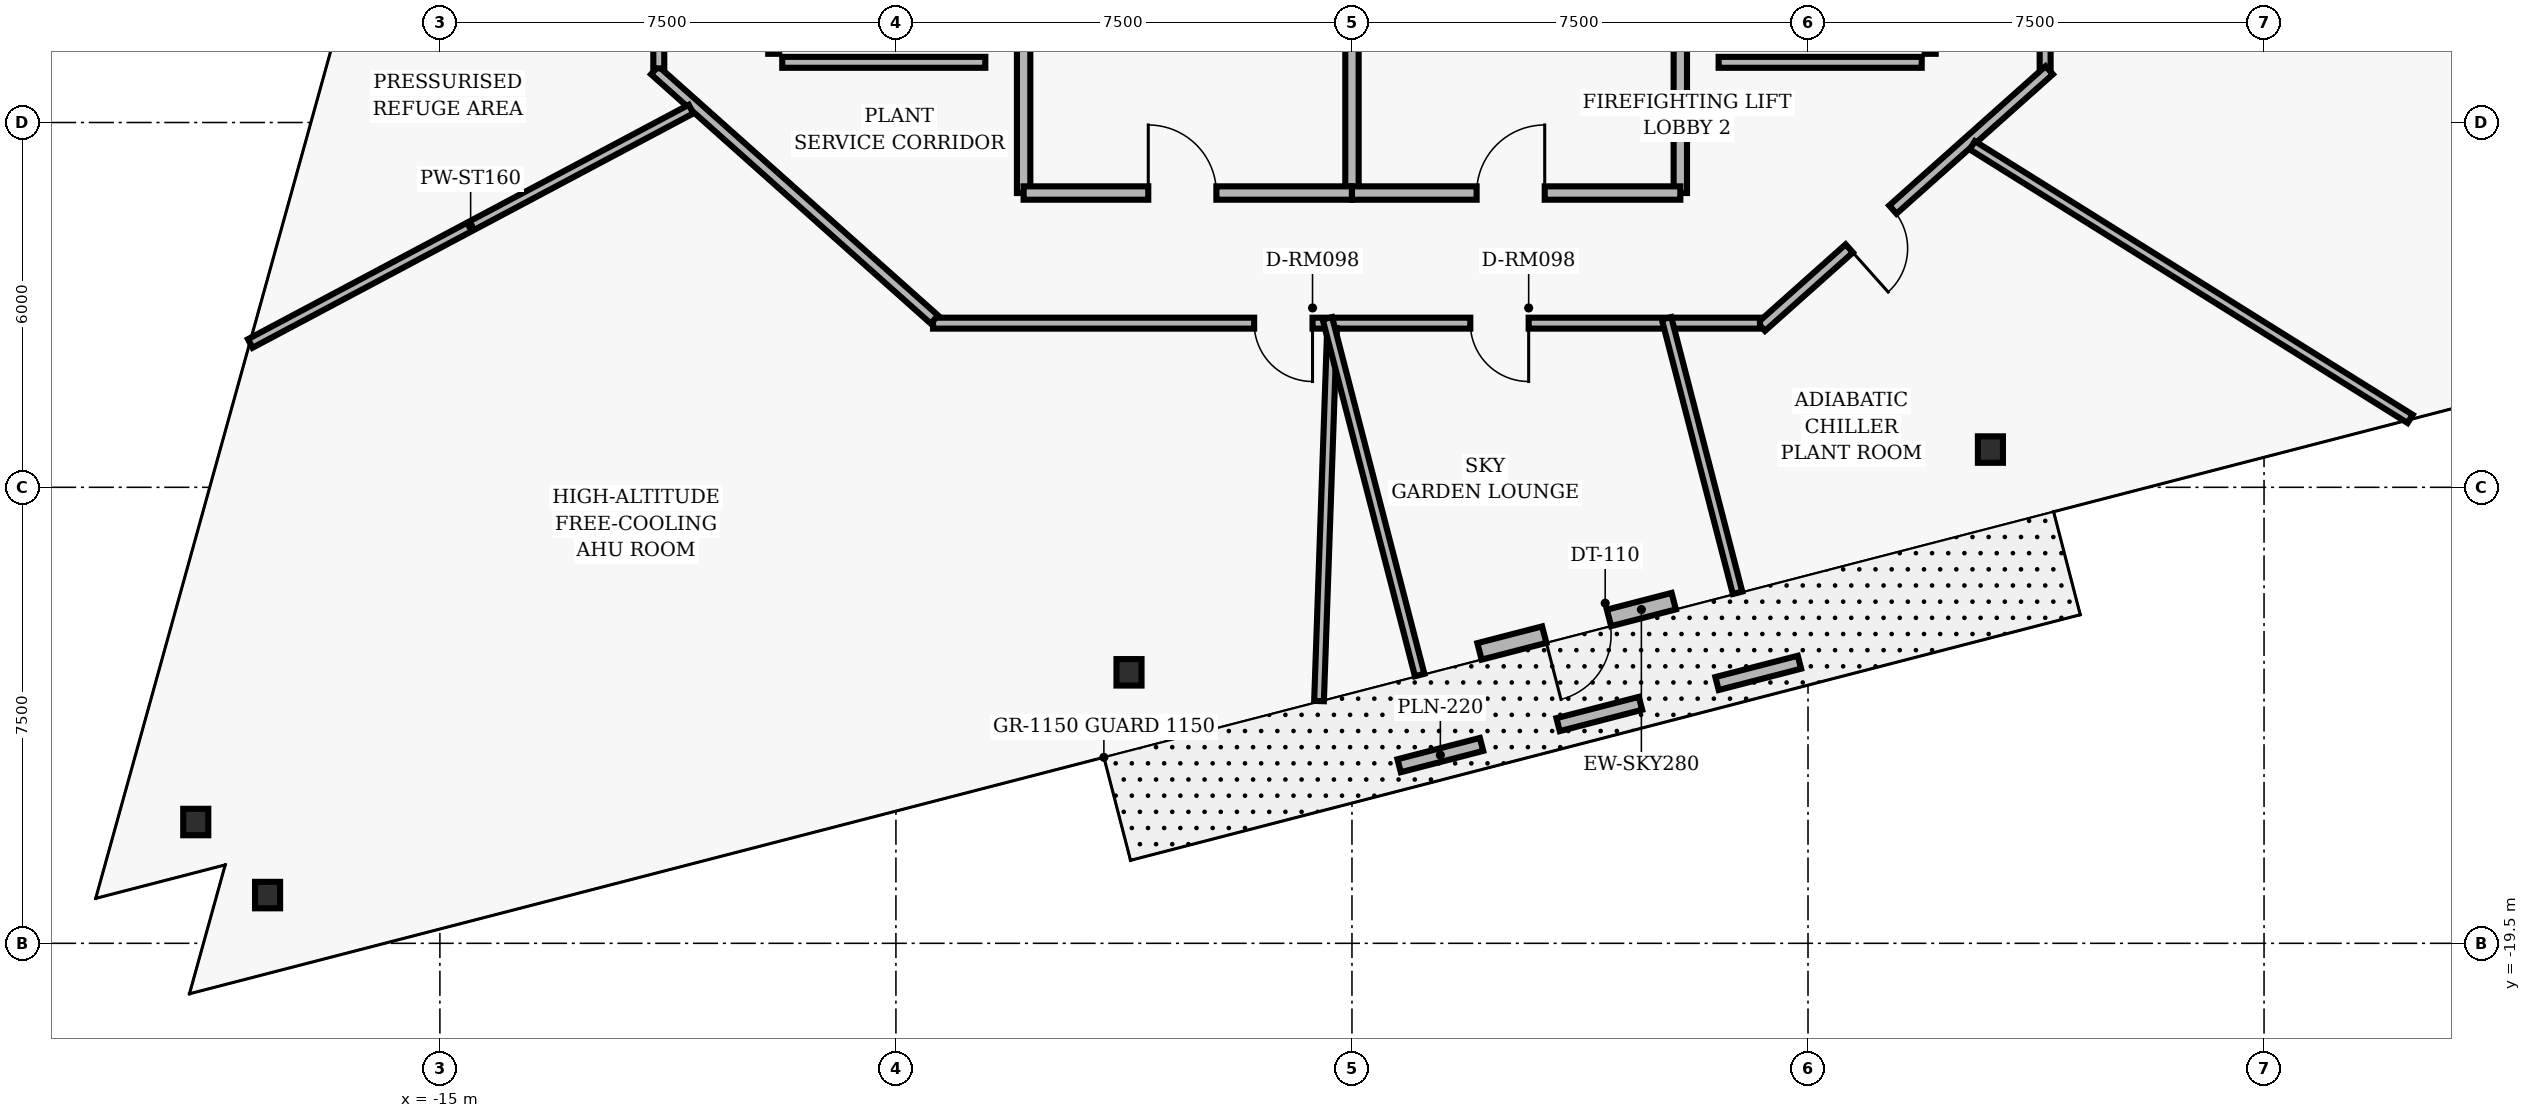
"""IFC4 building model, lengths in metres.
Left out: names, types, materials, properties, quantities, classifications, styles, units other than length and angle.
Written with IfcOpenShell. Run it as: python <this file> out.ifc"""

import sys

from ifc_helpers import new_model, si_unit, direction, frame, frame_2d, origin, origin_2d, place, context, subcontext, project, spatial, rectangle, i_section, extrude, element, fill, save


model = new_model("IFC4")
c1 = context("Model", 3, precision=1e-05, world=origin(), true_north=direction((0.0, 1.0)))
c2 = subcontext(c1, "Body", "Model", "MODEL_VIEW")
j1 = project(units=[si_unit("LENGTHUNIT", "METRE"), si_unit("PLANEANGLEUNIT", "RADIAN")], contexts=[c1])
p1 = place(None, origin())
s1 = spatial("IfcSite", under=j1, at=p1, CompositionType="ELEMENT")
p2 = place(p1, origin())
s2 = spatial("IfcBuilding", under=s1, at=p2, CompositionType="ELEMENT")
p3 = place(p2, frame((0.0, 0.0, 100.8)))
s3 = spatial("IfcBuildingStorey", under=s2, at=p3, CompositionType="ELEMENT", Elevation=100.8)
for number, where, z_axis, x_axis in (
    (1, (-19.015, -17.505, 0.0), (0.0, 0.0, 1.0), (1.0, 0.0, 0.0)),
    (2, (-17.834, -18.707, 0.0), (0.0, 0.0, 1.0), (1.0, 0.0, 0.0)),
    (3, (-3.667, -15.043, 0.0), (0.0, 0.0, 1.0), (1.0, 0.0, 0.0)),
    (4, (10.5, -11.379, 0.0), (0.0, 0.0, 1.0), (1.0, 0.0, 0.0)),
):
    element("IfcColumn", number, at=place(p3, frame(where, z_axis=z_axis, x_axis=x_axis)), inside=s3, PredefinedType="COLUMN", context=c2, shape_type="SweptSolid", body=[
        extrude(i_section(OverallWidth=0.412, OverallDepth=0.435, WebThickness=0.036, FlangeThickness=0.057, FilletRadius=0.022, at=origin_2d()), origin(), (0.0, 0.0, 1.0), 3.84),
    ])
for number, where, z_axis, x_axis in (
    (5, (0.776, -16.579, 0.0), (0.0, 0.0, 1.0), (0.968, 0.25, 0.0)),
    (6, (3.39, -15.903, 0.0), (0.0, 0.0, 1.0), (0.968, 0.25, 0.0)),
    (7, (6.004, -15.227, 0.0), (0.0, 0.0, 1.0), (0.968, 0.25, 0.0)),
):
    element("IfcWall", number, at=place(p3, frame(where, z_axis=z_axis, x_axis=x_axis)), inside=s3, PredefinedType="USERDEFINED", context=c2, shape_type="SweptSolid", body=[
        extrude(rectangle(XDim=1.4, YDim=0.22, at=frame_2d((0.7, 0.0))), origin(), (0.0, 0.0, 1.0), 0.65),
    ])
p4 = place(p3, frame((5.292, -13.873, 0.0), z_axis=(0.0, 0.0, 1.0), x_axis=(-0.968152477167, -0.250361300835, 0.0)))
e8 = element("IfcWall", 8, at=p4, inside=s3, PredefinedType="SOLIDWALL", context=c2, shape_type="SweptSolid", body=[
    extrude(rectangle(XDim=3.3, YDim=0.28, at=frame_2d((1.65, 0.0))), origin(), (0.0, 0.0, 1.0), 2.348),
])
p5 = place(p4, frame((1.1, 0.0, 0.0)))
e9 = element("IfcOpeningElement", 9, at=p5, cuts=e8, PredefinedType="OPENING", context=c2, shape_type="SweptSolid", body=[
    extrude(rectangle(XDim=1.1, YDim=2.15, at=frame_2d((0.55, 1.075))), frame((0.0, 0.15, 0.0), z_axis=(0.0, -1.0, 0.0), x_axis=(1.0, 0.0, 0.0)), (0.0, 0.0, 1.0), 0.3),
])
for number, where, z_axis, x_axis in (
    (10, (-5.4, -7.16, 0.0), (0.0, 0.0, 1.0), (0.0, 1.0, 0.0)),
    (11, (5.4, -7.16, 0.0), (0.0, 0.0, 1.0), (0.0, 1.0, 0.0)),
):
    element("IfcWall", number, at=place(p3, frame(where, z_axis=z_axis, x_axis=x_axis)), inside=s3, PredefinedType="PARTITIONING", context=c2, shape_type="SweptSolid", body=[
        extrude(rectangle(XDim=2.71, YDim=0.22, at=frame_2d((1.355, 0.0))), origin(), (0.0, 0.0, 1.0), 3.393),
    ])
p6 = place(p3, frame((0.0, -7.16, 0.0), z_axis=(0.0, 0.0, 1.0), x_axis=(0.0, 1.0, 0.0)))
e12 = element("IfcWall", 12, at=p6, inside=s3, PredefinedType="PARTITIONING", context=c2, shape_type="SweptSolid", body=[
    extrude(rectangle(XDim=2.81, YDim=0.22, at=frame_2d((1.405, 0.0))), origin(), (0.0, 0.0, 1.0), 3.393),
])
p7 = place(p3, frame((-5.4, -7.16, 0.0), z_axis=(0.0, 0.0, 1.0), x_axis=(1.0, 0.0, 0.0)))
e13 = element("IfcWall", 13, at=p7, inside=s3, PredefinedType="PARTITIONING", context=c2, shape_type="SweptSolid", body=[
    extrude(rectangle(XDim=5.4, YDim=0.22, at=frame_2d((2.7, 0.0))), origin(), (0.0, 0.0, 1.0), 2.907),
])
p8 = place(p7, frame((2.05, 0.0, 0.0)))
e14 = element("IfcOpeningElement", 14, at=p8, cuts=e13, PredefinedType="OPENING", context=c2, shape_type="SweptSolid", body=[
    extrude(rectangle(XDim=1.12, YDim=2.02, at=frame_2d((0.56, 1.01))), frame((0.0, 0.12, 0.0), z_axis=(0.0, -1.0, 0.0), x_axis=(1.0, 0.0, 0.0)), (0.0, 0.0, 1.0), 0.24),
])
p9 = place(p3, frame((0.0, -7.16, 0.0), z_axis=(0.0, 0.0, 1.0), x_axis=(1.0, 0.0, 0.0)))
e15 = element("IfcWall", 15, at=p9, inside=s3, PredefinedType="PARTITIONING", context=c2, shape_type="SweptSolid", body=[
    extrude(rectangle(XDim=5.4, YDim=0.22, at=frame_2d((2.7, 0.0))), origin(), (0.0, 0.0, 1.0), 2.907),
])
p10 = place(p9, frame((2.05, 0.0, 0.0)))
e16 = element("IfcOpeningElement", 16, at=p10, cuts=e15, PredefinedType="OPENING", context=c2, shape_type="SweptSolid", body=[
    extrude(rectangle(XDim=1.12, YDim=2.02, at=frame_2d((0.56, 1.01))), frame((0.0, 0.12, 0.0), z_axis=(0.0, -1.0, 0.0), x_axis=(1.0, 0.0, 0.0)), (0.0, 0.0, 1.0), 0.24),
])
p11 = place(p3, frame((11.4, 5.11, 0.0), z_axis=(0.0, 0.0, 1.0), x_axis=(0.0, -1.0, 0.0)))
e17 = element("IfcWall", 17, at=p11, inside=s3, PredefinedType="PARTITIONING", context=c2, shape_type="SweptSolid", body=[
    extrude(rectangle(XDim=10.22, YDim=0.18, at=frame_2d((5.11, 0.0))), origin(), (0.0, 0.0, 1.0), 2.907),
])
p12 = place(p11, frame((4.63, 0.0, 0.0)))
e18 = element("IfcOpeningElement", 18, at=p12, cuts=e17, PredefinedType="OPENING", context=c2, shape_type="SweptSolid", body=[
    extrude(rectangle(XDim=0.96, YDim=2.02, at=frame_2d((0.48, 1.01))), frame((0.0, 0.1, 0.0), z_axis=(0.0, -1.0, 0.0), x_axis=(1.0, 0.0, 0.0)), (0.0, 0.0, 1.0), 0.2),
])
p13 = place(p3, frame((11.467, -5.14, 0.0), z_axis=(0.0, 0.0, 1.0), x_axis=(-0.746516597114, -0.665366793756, 0.0)))
e19 = element("IfcWall", 19, at=p13, inside=s3, PredefinedType="PARTITIONING", context=c2, shape_type="SweptSolid", body=[
    extrude(rectangle(XDim=6.342, YDim=0.18, at=frame_2d((3.171, 0.0))), origin(), (0.0, 0.0, 1.0), 3.393),
])
p14 = place(p13, frame((3.445, 0.0, 0.0)))
e20 = element("IfcOpeningElement", 20, at=p14, cuts=e19, PredefinedType="OPENING", context=c2, shape_type="SweptSolid", body=[
    extrude(rectangle(XDim=0.96, YDim=2.02, at=frame_2d((0.48, 1.01))), frame((0.0, 0.1, 0.0), z_axis=(0.0, -1.0, 0.0), x_axis=(1.0, 0.0, 0.0)), (0.0, 0.0, 1.0), 0.2),
])
p15 = place(p3, frame((6.71, -9.3, 0.0), z_axis=(0.0, 0.0, 1.0), x_axis=(-1.0, 0.0, 0.0)))
e21 = element("IfcWall", 21, at=p15, inside=s3, PredefinedType="PARTITIONING", context=c2, shape_type="SweptSolid", body=[
    extrude(rectangle(XDim=13.6, YDim=0.18, at=frame_2d((6.8, 0.0))), origin(), (0.0, 0.0, 1.0), 2.907),
])
p16 = place(p15, frame((3.804, 0.0, 0.0)))
e22 = element("IfcOpeningElement", 22, at=p16, cuts=e21, PredefinedType="OPENING", context=c2, shape_type="SweptSolid", body=[
    extrude(rectangle(XDim=0.96, YDim=2.02, at=frame_2d((0.48, 1.01))), frame((0.0, 0.1, 0.0), z_axis=(0.0, -1.0, 0.0), x_axis=(1.0, 0.0, 0.0)), (0.0, 0.0, 1.0), 0.2),
])
p17 = place(p15, frame((7.359, 0.0, 0.0)))
e23 = element("IfcOpeningElement", 23, at=p17, cuts=e21, PredefinedType="OPENING", context=c2, shape_type="SweptSolid", body=[
    extrude(rectangle(XDim=0.96, YDim=2.02, at=frame_2d((0.48, 1.01))), frame((0.0, 0.1, 0.0), z_axis=(0.0, -1.0, 0.0), x_axis=(1.0, 0.0, 0.0)), (0.0, 0.0, 1.0), 0.2),
])
p18 = place(p3, frame((-6.867, -9.24, 0.0), z_axis=(0.0, 0.0, 1.0), x_axis=(-0.746532095616, 0.665349404611, 0.0)))
e24 = element("IfcWall", 24, at=p18, inside=s3, PredefinedType="PARTITIONING", context=c2, shape_type="SweptSolid", body=[
    extrude(rectangle(XDim=6.162, YDim=0.18, at=frame_2d((3.081, 0.0))), origin(), (0.0, 0.0, 1.0), 3.393),
])
p19 = place(p3, frame((-11.4, -5.11, 0.0), z_axis=(0.0, 0.0, 1.0), x_axis=(0.0, 1.0, 0.0)))
e25 = element("IfcWall", 25, at=p19, inside=s3, PredefinedType="PARTITIONING", context=c2, shape_type="SweptSolid", body=[
    extrude(rectangle(XDim=10.22, YDim=0.18, at=frame_2d((5.11, 0.0))), origin(), (0.0, 0.0, 1.0), 2.907),
])
p20 = place(p19, frame((4.63, 0.0, 0.0)))
e26 = element("IfcOpeningElement", 26, at=p20, cuts=e25, PredefinedType="OPENING", context=c2, shape_type="SweptSolid", body=[
    extrude(rectangle(XDim=0.96, YDim=2.02, at=frame_2d((0.48, 1.01))), frame((0.0, 0.1, 0.0), z_axis=(0.0, -1.0, 0.0), x_axis=(1.0, 0.0, 0.0)), (0.0, 0.0, 1.0), 0.2),
])
p21 = place(p3, frame((-9.51, 4.87, 0.0), z_axis=(0.0, 0.0, 1.0), x_axis=(0.0, -1.0, 0.0)))
e27 = element("IfcWall", 27, at=p21, inside=s3, PredefinedType="PARTITIONING", context=c2, shape_type="SweptSolid", body=[
    extrude(rectangle(XDim=9.74, YDim=0.18, at=frame_2d((4.87, 0.0))), origin(), (0.0, 0.0, 1.0), 2.907),
])
for number, where, z_axis, x_axis in (
    (28, (-9.37, -5.01, 0.0), (0.0, 0.0, 1.0), (1.0, 0.0, 0.0)),
    (29, (6.03, -5.01, 0.0), (0.0, 0.0, 1.0), (1.0, 0.0, 0.0)),
):
    element("IfcWall", number, at=place(p3, frame(where, z_axis=z_axis, x_axis=x_axis)), inside=s3, PredefinedType="PARTITIONING", context=c2, shape_type="SweptSolid", body=[
        extrude(rectangle(XDim=3.34, YDim=0.18, at=frame_2d((1.67, 0.0))), origin(), (0.0, 0.0, 1.0), 3.393),
    ])
p22 = place(p3, frame((9.51, -4.87, 0.0), z_axis=(0.0, 0.0, 1.0), x_axis=(0.0, 1.0, 0.0)))
e30 = element("IfcWall", 30, at=p22, inside=s3, PredefinedType="PARTITIONING", context=c2, shape_type="SweptSolid", body=[
    extrude(rectangle(XDim=9.74, YDim=0.18, at=frame_2d((4.87, 0.0))), origin(), (0.0, 0.0, 1.0), 2.6),
])
p23 = place(p3, frame((-10.87, -5.78, 0.0), z_axis=(0.0, 0.0, 1.0), x_axis=(-0.882935860211, -0.469493628022, 0.0)))
e31 = element("IfcWall", 31, at=p23, inside=s3, PredefinedType="PARTITIONING", context=c2, shape_type="SweptSolid", body=[
    extrude(rectangle(XDim=8.21, YDim=0.16, at=frame_2d((4.105, 0.0))), origin(), (0.0, 0.0, 1.0), 3.393),
])
p24 = place(p3, frame((-0.328, -9.38, 0.0), z_axis=(0.0, 0.0, 1.0), x_axis=(-0.034875909332, -0.99939165043, 0.0)))
e32 = element("IfcWall", 32, at=p24, inside=s3, PredefinedType="PARTITIONING", context=c2, shape_type="SweptSolid", body=[
    extrude(rectangle(XDim=6.139, YDim=0.16, at=frame_2d((3.07, 0.0))), origin(), (0.0, 0.0, 1.0), 3.393),
])
p25 = place(p3, frame((10.202, -6.375, 0.0), z_axis=(0.0, 0.0, 1.0), x_axis=(0.848062908476, -0.529895558829, 0.0)))
e33 = element("IfcWall", 33, at=p25, inside=s3, PredefinedType="PARTITIONING", context=c2, shape_type="SweptSolid", body=[
    extrude(rectangle(XDim=8.491, YDim=0.16, at=frame_2d((4.246, 0.0))), origin(), (0.0, 0.0, 1.0), 3.393),
])
p26 = place(p3, frame((-0.404, -9.22, 0.0), z_axis=(0.0, 0.0, 1.0), x_axis=(0.250366546607, -0.968151120611, 0.0)))
e34 = element("IfcWall", 34, at=p26, inside=s3, PredefinedType="PARTITIONING", context=c2, shape_type="SweptSolid", body=[
    extrude(rectangle(XDim=6.061, YDim=0.16, at=frame_2d((3.03, 0.0))), origin(), (0.0, 0.0, 1.0), 3.393),
])
p27 = place(p3, frame((6.341, -13.735, 0.0), z_axis=(0.0, 0.0, 1.0), x_axis=(-0.250373516553, 0.968149318137, 0.0)))
e35 = element("IfcWall", 35, at=p27, inside=s3, PredefinedType="PARTITIONING", context=c2, shape_type="SweptSolid", body=[
    extrude(rectangle(XDim=4.664, YDim=0.16, at=frame_2d((2.332, 0.0))), origin(), (0.0, 0.0, 1.0), 3.393),
])
p28 = place(p5, origin())
e36 = element("IfcDoor", 36, at=p28, inside=s3, OperationType="SINGLE_SWING_RIGHT", PredefinedType="DOOR", context=c2, shape_type="SweptSolid", body=[
    extrude(rectangle(XDim=1.1, YDim=2.15, at=frame_2d((0.55, 1.075))), frame((0.0, 0.025, 0.0), z_axis=(0.0, -1.0, 0.0), x_axis=(1.0, 0.0, 0.0)), (0.0, 0.0, 1.0), 0.05),
])
fill(e9, e36)
p29 = place(p8, origin())
e37 = element("IfcDoor", 37, at=p29, inside=s3, OperationType="SINGLE_SWING_LEFT", PredefinedType="DOOR", context=c2, shape_type="SweptSolid", body=[
    extrude(rectangle(XDim=1.12, YDim=2.02, at=frame_2d((0.56, 1.01))), frame((0.0, 0.025, 0.0), z_axis=(0.0, -1.0, 0.0), x_axis=(1.0, 0.0, 0.0)), (0.0, 0.0, 1.0), 0.05),
])
fill(e14, e37)
p30 = place(p10, origin())
e38 = element("IfcDoor", 38, at=p30, inside=s3, OperationType="SINGLE_SWING_RIGHT", PredefinedType="DOOR", context=c2, shape_type="SweptSolid", body=[
    extrude(rectangle(XDim=1.12, YDim=2.02, at=frame_2d((0.56, 1.01))), frame((0.0, 0.025, 0.0), z_axis=(0.0, -1.0, 0.0), x_axis=(1.0, 0.0, 0.0)), (0.0, 0.0, 1.0), 0.05),
])
fill(e16, e38)
p31 = place(p16, origin())
e39 = element("IfcDoor", 39, at=p31, inside=s3, OperationType="SINGLE_SWING_LEFT", PredefinedType="DOOR", context=c2, shape_type="SweptSolid", body=[
    extrude(rectangle(XDim=0.96, YDim=2.02, at=frame_2d((0.48, 1.01))), frame((0.0, 0.025, 0.0), z_axis=(0.0, -1.0, 0.0), x_axis=(1.0, 0.0, 0.0)), (0.0, 0.0, 1.0), 0.05),
])
fill(e22, e39)
p32 = place(p17, origin())
e40 = element("IfcDoor", 40, at=p32, inside=s3, OperationType="SINGLE_SWING_LEFT", PredefinedType="DOOR", context=c2, shape_type="SweptSolid", body=[
    extrude(rectangle(XDim=0.96, YDim=2.02, at=frame_2d((0.48, 1.01))), frame((0.0, 0.025, 0.0), z_axis=(0.0, -1.0, 0.0), x_axis=(1.0, 0.0, 0.0)), (0.0, 0.0, 1.0), 0.05),
])
fill(e23, e40)
p33 = place(p14, origin())
e41 = element("IfcDoor", 41, at=p33, inside=s3, OperationType="SINGLE_SWING_RIGHT", PredefinedType="DOOR", context=c2, shape_type="SweptSolid", body=[
    extrude(rectangle(XDim=0.96, YDim=2.02, at=frame_2d((0.48, 1.01))), frame((0.0, 0.025, 0.0), z_axis=(0.0, -1.0, 0.0), x_axis=(1.0, 0.0, 0.0)), (0.0, 0.0, 1.0), 0.05),
])
fill(e20, e41)
save(model, sys.argv[1])
